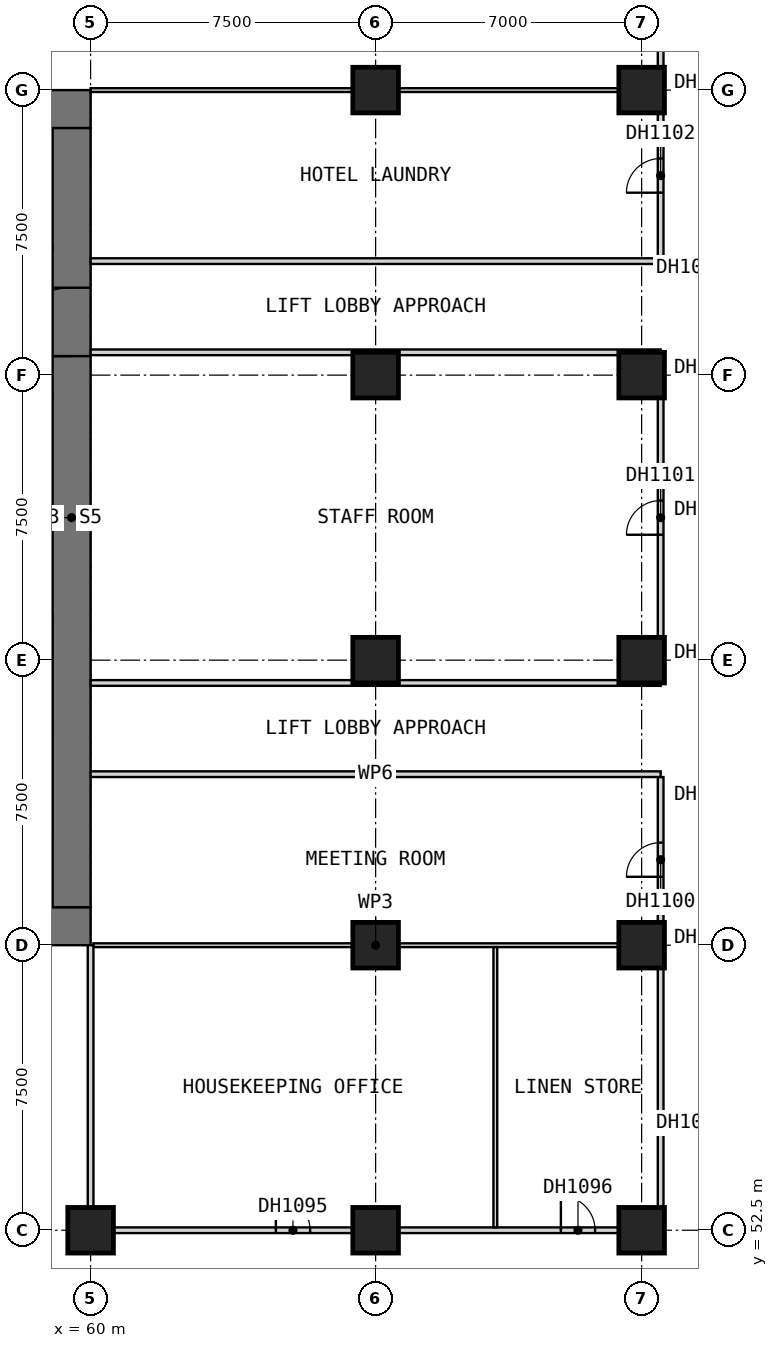
"""IFC4 building model, lengths in metres.
Left out: names, types, materials, properties, quantities, classifications, styles, units other than length and angle.
Written with IfcOpenShell. Run it as: python <this file> out.ifc"""

import sys

from ifc_helpers import new_model, si_unit, direction, frame, frame_2d, origin, origin_2d, place, context, subcontext, project, spatial, rectangle, extrude, element, fill, save


model = new_model("IFC4")
c1 = context("Model", 3, precision=1e-05, world=origin(), true_north=direction((0.0, 1.0)))
c2 = subcontext(c1, "Body", "Model", "MODEL_VIEW")
j1 = project(units=[si_unit("LENGTHUNIT", "METRE"), si_unit("PLANEANGLEUNIT", "RADIAN")], contexts=[c1])
p1 = place(None, origin())
s1 = spatial("IfcSite", under=j1, at=p1, CompositionType="ELEMENT")
p2 = place(p1, origin())
s2 = spatial("IfcBuilding", under=s1, at=p2, CompositionType="ELEMENT")
p3 = place(p2, frame((0.0, 0.0, 34.0)))
s3 = spatial("IfcBuildingStorey", under=s2, at=p3, CompositionType="ELEMENT", Elevation=34.0)
for number, where, z_axis, x_axis in (
    (1, (60.0, 52.5, 0.0), (0.0, 0.0, 1.0), (1.0, 0.0, 0.0)),
    (2, (67.5, 52.5, 0.0), (0.0, 0.0, 1.0), (1.0, 0.0, 0.0)),
    (3, (67.5, 60.0, 0.0), (0.0, 0.0, 1.0), (1.0, 0.0, 0.0)),
    (4, (67.5, 67.5, 0.0), (0.0, 0.0, 1.0), (1.0, 0.0, 0.0)),
    (5, (67.5, 75.0, 0.0), (0.0, 0.0, 1.0), (1.0, 0.0, 0.0)),
    (6, (67.5, 82.5, 0.0), (0.0, 0.0, 1.0), (1.0, 0.0, 0.0)),
    (7, (74.5, 52.5, 0.0), (0.0, 0.0, 1.0), (1.0, 0.0, 0.0)),
    (8, (74.5, 60.0, 0.0), (0.0, 0.0, 1.0), (1.0, 0.0, 0.0)),
    (9, (74.5, 67.5, 0.0), (0.0, 0.0, 1.0), (1.0, 0.0, 0.0)),
    (10, (74.5, 75.0, 0.0), (0.0, 0.0, 1.0), (1.0, 0.0, 0.0)),
    (11, (74.5, 82.5, 0.0), (0.0, 0.0, 1.0), (1.0, 0.0, 0.0)),
):
    element("IfcColumn", number, at=place(p3, frame(where, z_axis=z_axis, x_axis=x_axis)), inside=s3, PredefinedType="COLUMN", context=c2, shape_type="SweptSolid", body=[
        extrude(rectangle(XDim=1.2, YDim=1.2, at=origin_2d()), origin(), (0.0, 0.0, 1.0), 3.6),
    ])
p4 = place(p3, frame((30.0, 60.5, 0.0), z_axis=(0.0, 0.0, 1.0), x_axis=(1.0, 0.0, 0.0)))
e12 = element("IfcWall", 12, at=p4, inside=s3, PredefinedType="SHEAR", context=c2, shape_type="SweptSolid", body=[
    extrude(rectangle(XDim=30.0, YDim=1.0, at=frame_2d((15.0, 0.0))), origin(), (0.0, 0.0, 1.0), 3.6),
])
p5 = place(p4, frame((21.9, 0.0, 0.0)))
e13 = element("IfcOpeningElement", 13, at=p5, cuts=e12, PredefinedType="OPENING", context=c2, shape_type="SweptSolid", body=[
    extrude(rectangle(XDim=1.8, YDim=2.1, at=frame_2d((0.9, 1.05))), frame((0.0, 0.51, 0.0), z_axis=(0.0, -1.0, 0.0), x_axis=(1.0, 0.0, 0.0)), (0.0, 0.0, 1.0), 1.02),
])
p6 = place(p4, frame((26.5, 0.0, 0.0)))
e14 = element("IfcOpeningElement", 14, at=p6, cuts=e12, PredefinedType="OPENING", context=c2, shape_type="SweptSolid", body=[
    extrude(rectangle(XDim=1.2, YDim=2.1, at=frame_2d((0.6, 1.05))), frame((0.0, 0.51, 0.0), z_axis=(0.0, -1.0, 0.0), x_axis=(1.0, 0.0, 0.0)), (0.0, 0.0, 1.0), 1.02),
])
p7 = place(p3, frame((30.0, 82.0, 0.0), z_axis=(0.0, 0.0, 1.0), x_axis=(1.0, 0.0, 0.0)))
e15 = element("IfcWall", 15, at=p7, inside=s3, PredefinedType="SHEAR", context=c2, shape_type="SweptSolid", body=[
    extrude(rectangle(XDim=30.0, YDim=1.0, at=frame_2d((15.0, 0.0))), origin(), (0.0, 0.0, 1.0), 3.6),
])
p8 = place(p3, frame((59.5, 61.0, 0.0), z_axis=(0.0, 0.0, 1.0), x_axis=(0.0, 1.0, 0.0)))
e16 = element("IfcWall", 16, at=p8, inside=s3, PredefinedType="SHEAR", context=c2, shape_type="SweptSolid", body=[
    extrude(rectangle(XDim=20.5, YDim=1.0, at=frame_2d((10.25, 0.0))), origin(), (0.0, 0.0, 1.0), 3.6),
])
p9 = place(p8, frame((14.5, 0.0, 0.0)))
e17 = element("IfcOpeningElement", 17, at=p9, cuts=e16, PredefinedType="OPENING", context=c2, shape_type="SweptSolid", body=[
    extrude(rectangle(XDim=1.8, YDim=2.1, at=frame_2d((0.9, 1.05))), frame((0.0, 0.51, 0.0), z_axis=(0.0, -1.0, 0.0), x_axis=(1.0, 0.0, 0.0)), (0.0, 0.0, 1.0), 1.02),
])
p10 = place(p3, frame((60.0, 52.5, 0.0), z_axis=(0.0, 0.0, 1.0), x_axis=(1.0, 0.0, 0.0)))
e18 = element("IfcWall", 18, at=p10, inside=s3, PredefinedType="PARTITIONING", context=c2, shape_type="SweptSolid", body=[
    extrude(rectangle(XDim=15.0, YDim=0.15, at=frame_2d((7.5, 0.0))), origin(), (0.0, 0.0, 1.0), 3.35),
])
p11 = place(p10, frame((4.875, 0.0, 0.0)))
e19 = element("IfcOpeningElement", 19, at=p11, cuts=e18, PredefinedType="OPENING", context=c2, shape_type="SweptSolid", body=[
    extrude(rectangle(XDim=0.9, YDim=2.1, at=frame_2d((0.45, 1.05))), frame((0.0, 0.085, 0.0), z_axis=(0.0, -1.0, 0.0), x_axis=(1.0, 0.0, 0.0)), (0.0, 0.0, 1.0), 0.17),
])
p12 = place(p10, frame((12.375, 0.0, 0.0)))
e20 = element("IfcOpeningElement", 20, at=p12, cuts=e18, PredefinedType="OPENING", context=c2, shape_type="SweptSolid", body=[
    extrude(rectangle(XDim=0.9, YDim=2.1, at=frame_2d((0.45, 1.05))), frame((0.0, 0.085, 0.0), z_axis=(0.0, -1.0, 0.0), x_axis=(1.0, 0.0, 0.0)), (0.0, 0.0, 1.0), 0.17),
])
p13 = place(p3, frame((75.0, 52.575, 0.0), z_axis=(0.0, 0.0, 1.0), x_axis=(0.0, 1.0, 0.0)))
e21 = element("IfcWall", 21, at=p13, inside=s3, PredefinedType="PARTITIONING", context=c2, shape_type="SweptSolid", body=[
    extrude(rectangle(XDim=11.85, YDim=0.15, at=frame_2d((5.925, 0.0))), origin(), (0.0, 0.0, 1.0), 3.35),
])
p14 = place(p13, frame((9.225, 0.0, 0.0)))
e22 = element("IfcOpeningElement", 22, at=p14, cuts=e21, PredefinedType="OPENING", context=c2, shape_type="SweptSolid", body=[
    extrude(rectangle(XDim=0.9, YDim=2.1, at=frame_2d((0.45, 1.05))), frame((0.0, 0.085, 0.0), z_axis=(0.0, -1.0, 0.0), x_axis=(1.0, 0.0, 0.0)), (0.0, 0.0, 1.0), 0.17),
])
p15 = place(p3, frame((75.0, 66.975, 0.0), z_axis=(0.0, 0.0, 1.0), x_axis=(0.0, 1.0, 0.0)))
e23 = element("IfcWall", 23, at=p15, inside=s3, PredefinedType="PARTITIONING", context=c2, shape_type="SweptSolid", body=[
    extrude(rectangle(XDim=8.55, YDim=0.15, at=frame_2d((4.275, 0.0))), origin(), (0.0, 0.0, 1.0), 3.35),
])
p16 = place(p15, frame((3.825, 0.0, 0.0)))
e24 = element("IfcOpeningElement", 24, at=p16, cuts=e23, PredefinedType="OPENING", context=c2, shape_type="SweptSolid", body=[
    extrude(rectangle(XDim=0.9, YDim=2.1, at=frame_2d((0.45, 1.05))), frame((0.0, 0.085, 0.0), z_axis=(0.0, -1.0, 0.0), x_axis=(1.0, 0.0, 0.0)), (0.0, 0.0, 1.0), 0.17),
])
p17 = place(p3, frame((75.0, 78.075, 0.0), z_axis=(0.0, 0.0, 1.0), x_axis=(0.0, 1.0, 0.0)))
e25 = element("IfcWall", 25, at=p17, inside=s3, PredefinedType="PARTITIONING", context=c2, shape_type="SweptSolid", body=[
    extrude(rectangle(XDim=11.85, YDim=0.15, at=frame_2d((5.925, 0.0))), origin(), (0.0, 0.0, 1.0), 3.35),
])
p18 = place(p17, frame((7.725, 0.0, 0.0)))
e26 = element("IfcOpeningElement", 26, at=p18, cuts=e25, PredefinedType="OPENING", context=c2, shape_type="SweptSolid", body=[
    extrude(rectangle(XDim=0.9, YDim=2.1, at=frame_2d((0.45, 1.05))), frame((0.0, 0.085, 0.0), z_axis=(0.0, -1.0, 0.0), x_axis=(1.0, 0.0, 0.0)), (0.0, 0.0, 1.0), 0.17),
])
p19 = place(p17, frame((1.725, 0.0, 0.0)))
e27 = element("IfcOpeningElement", 27, at=p19, cuts=e25, PredefinedType="OPENING", context=c2, shape_type="SweptSolid", body=[
    extrude(rectangle(XDim=0.9, YDim=2.1, at=frame_2d((0.45, 1.05))), frame((0.0, 0.085, 0.0), z_axis=(0.0, -1.0, 0.0), x_axis=(1.0, 0.0, 0.0)), (0.0, 0.0, 1.0), 0.17),
])
p20 = place(p3, frame((60.075, 60.0, 0.0), z_axis=(0.0, 0.0, 1.0), x_axis=(1.0, 0.0, 0.0)))
e28 = element("IfcWall", 28, at=p20, inside=s3, PredefinedType="PARTITIONING", context=c2, shape_type="SweptSolid", body=[
    extrude(rectangle(XDim=14.85, YDim=0.1, at=frame_2d((7.425, 0.0))), origin(), (0.0, 0.0, 1.0), 3.35),
])
p21 = place(p3, frame((60.0, 82.5, 0.0), z_axis=(0.0, 0.0, 1.0), x_axis=(1.0, 0.0, 0.0)))
e29 = element("IfcWall", 29, at=p21, inside=s3, PredefinedType="PARTITIONING", context=c2, shape_type="SweptSolid", body=[
    extrude(rectangle(XDim=14.925, YDim=0.1, at=frame_2d((7.462, 0.0))), origin(), (0.0, 0.0, 1.0), 3.35),
])
p22 = place(p3, frame((70.65, 52.575, 0.0), z_axis=(0.0, 0.0, 1.0), x_axis=(0.0, 1.0, 0.0)))
e30 = element("IfcWall", 30, at=p22, inside=s3, PredefinedType="PARTITIONING", context=c2, shape_type="SweptSolid", body=[
    extrude(rectangle(XDim=7.375, YDim=0.1, at=frame_2d((3.688, 0.0))), origin(), (0.0, 0.0, 1.0), 3.35),
])
for number, where, z_axis, x_axis in (
    (31, (60.0, 64.5, 0.0), (0.0, 0.0, 1.0), (1.0, 0.0, 0.0)),
    (32, (60.0, 66.9, 0.0), (0.0, 0.0, 1.0), (1.0, 0.0, 0.0)),
    (33, (60.0, 75.6, 0.0), (0.0, 0.0, 1.0), (1.0, 0.0, 0.0)),
    (34, (60.0, 78.0, 0.0), (0.0, 0.0, 1.0), (1.0, 0.0, 0.0)),
):
    element("IfcWall", number, at=place(p3, frame(where, z_axis=z_axis, x_axis=x_axis)), inside=s3, PredefinedType="PARTITIONING", context=c2, shape_type="SweptSolid", body=[
        extrude(rectangle(XDim=15.0, YDim=0.15, at=frame_2d((7.5, 0.0))), origin(), (0.0, 0.0, 1.0), 3.35),
    ])
p23 = place(p3, frame((60.0, 52.575, 0.0), z_axis=(0.0, 0.0, 1.0), x_axis=(0.0, 1.0, 0.0)))
e35 = element("IfcWall", 35, at=p23, inside=s3, PredefinedType="PARTITIONING", context=c2, shape_type="SweptSolid", body=[
    extrude(rectangle(XDim=7.425, YDim=0.15, at=frame_2d((3.712, 0.0))), origin(), (0.0, 0.0, 1.0), 3.35),
])
p24 = place(p9, origin())
e36 = element("IfcDoor", 36, at=p24, inside=s3, OperationType="DOUBLE_DOOR_SINGLE_SWING", PredefinedType="DOOR", context=c2, shape_type="SweptSolid", body=[
    extrude(rectangle(XDim=1.8, YDim=2.1, at=frame_2d((0.9, 1.05))), frame((0.0, 0.025, 0.0), z_axis=(0.0, -1.0, 0.0), x_axis=(1.0, 0.0, 0.0)), (0.0, 0.0, 1.0), 0.05),
])
fill(e17, e36)
p25 = place(p11, origin())
e37 = element("IfcDoor", 37, at=p25, inside=s3, OperationType="SINGLE_SWING_RIGHT", PredefinedType="DOOR", context=c2, shape_type="SweptSolid", body=[
    extrude(rectangle(XDim=0.9, YDim=2.1, at=frame_2d((0.45, 1.05))), frame((0.0, 0.025, 0.0), z_axis=(0.0, -1.0, 0.0), x_axis=(1.0, 0.0, 0.0)), (0.0, 0.0, 1.0), 0.05),
])
fill(e19, e37)
p26 = place(p12, origin())
e38 = element("IfcDoor", 38, at=p26, inside=s3, OperationType="SINGLE_SWING_RIGHT", PredefinedType="DOOR", context=c2, shape_type="SweptSolid", body=[
    extrude(rectangle(XDim=0.9, YDim=2.1, at=frame_2d((0.45, 1.05))), frame((0.0, 0.025, 0.0), z_axis=(0.0, -1.0, 0.0), x_axis=(1.0, 0.0, 0.0)), (0.0, 0.0, 1.0), 0.05),
])
fill(e20, e38)
p27 = place(p14, origin())
e39 = element("IfcDoor", 39, at=p27, inside=s3, OperationType="SINGLE_SWING_LEFT", PredefinedType="DOOR", context=c2, shape_type="SweptSolid", body=[
    extrude(rectangle(XDim=0.9, YDim=2.1, at=frame_2d((0.45, 1.05))), frame((0.0, 0.025, 0.0), z_axis=(0.0, -1.0, 0.0), x_axis=(1.0, 0.0, 0.0)), (0.0, 0.0, 1.0), 0.05),
])
fill(e22, e39)
p28 = place(p16, origin())
e40 = element("IfcDoor", 40, at=p28, inside=s3, OperationType="SINGLE_SWING_LEFT", PredefinedType="DOOR", context=c2, shape_type="SweptSolid", body=[
    extrude(rectangle(XDim=0.9, YDim=2.1, at=frame_2d((0.45, 1.05))), frame((0.0, 0.025, 0.0), z_axis=(0.0, -1.0, 0.0), x_axis=(1.0, 0.0, 0.0)), (0.0, 0.0, 1.0), 0.05),
])
fill(e24, e40)
p29 = place(p19, origin())
e41 = element("IfcDoor", 41, at=p29, inside=s3, OperationType="SINGLE_SWING_LEFT", PredefinedType="DOOR", context=c2, shape_type="SweptSolid", body=[
    extrude(rectangle(XDim=0.9, YDim=2.1, at=frame_2d((0.45, 1.05))), frame((0.0, 0.025, 0.0), z_axis=(0.0, -1.0, 0.0), x_axis=(1.0, 0.0, 0.0)), (0.0, 0.0, 1.0), 0.05),
])
fill(e27, e41)
save(model, sys.argv[1])
